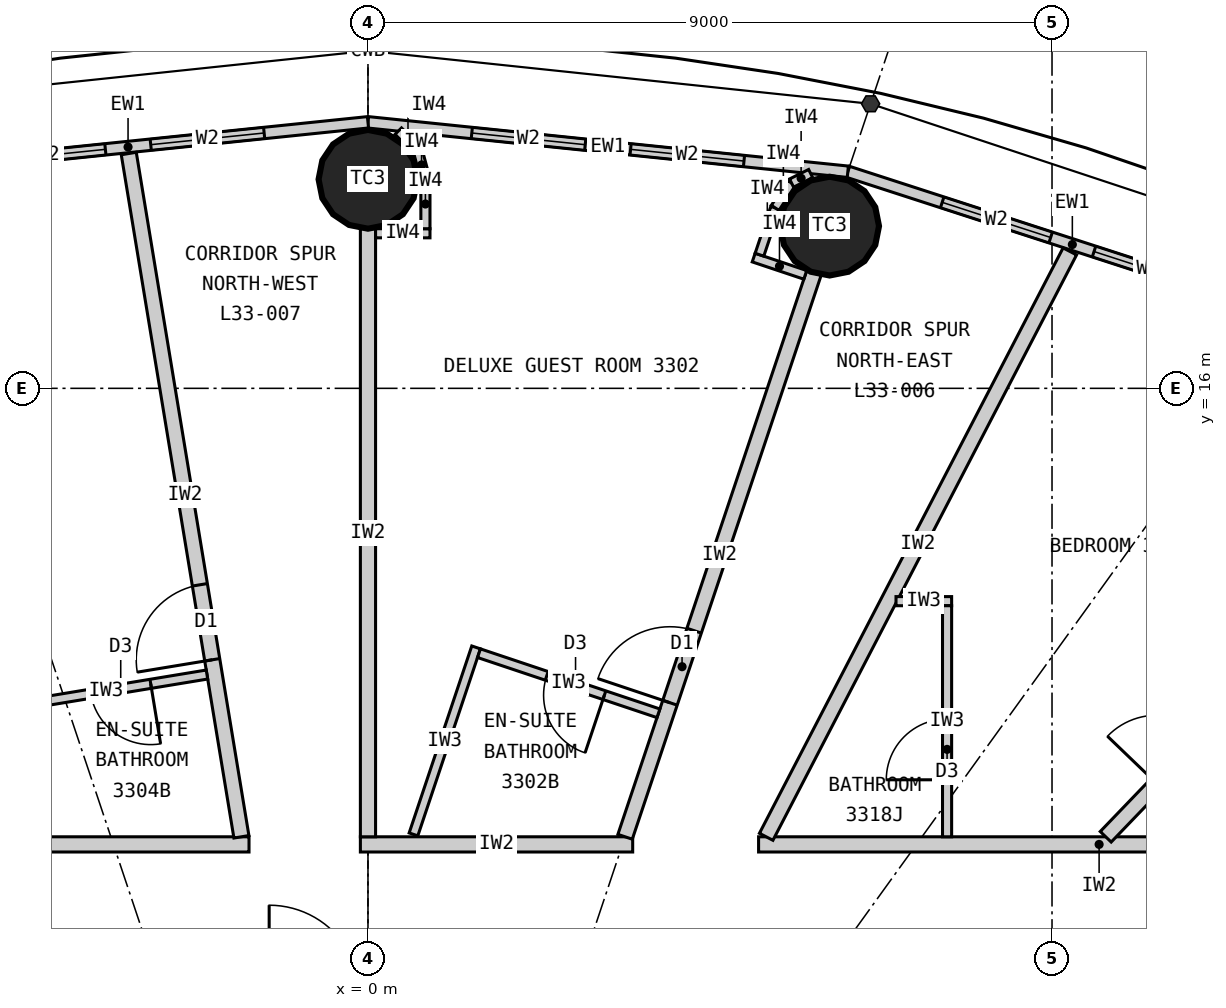
"""IFC4 building model, lengths in metres.
Left out: names, types, materials, properties, quantities, classifications, styles, units other than length and angle.
Written with IfcOpenShell. Run it as: python <this file> out.ifc"""

import sys

from ifc_helpers import new_model, si_unit, direction, frame, frame_2d, origin, origin_2d, place, context, subcontext, project, spatial, rectangle, circle, extrude, element, fill, save


model = new_model("IFC4")
c1 = context("Model", 3, precision=1e-05, world=origin(), true_north=direction((0.0, 1.0)))
c2 = subcontext(c1, "Body", "Model", "MODEL_VIEW")
j1 = project(units=[si_unit("LENGTHUNIT", "METRE"), si_unit("PLANEANGLEUNIT", "RADIAN")], contexts=[c1])
p1 = place(None, origin())
s1 = spatial("IfcSite", under=j1, at=p1, CompositionType="ELEMENT")
p2 = place(p1, origin())
s2 = spatial("IfcBuilding", under=s1, at=p2, CompositionType="ELEMENT")
p3 = place(p2, frame((0.0, 0.0, 128.7)))
s3 = spatial("IfcBuildingStorey", under=s2, at=p3, CompositionType="ELEMENT", Elevation=128.7)
for number, where, z_axis, x_axis in (
    (1, (6.074, 18.135, 0.0), (0.0, 0.0, 1.0), (1.0, 0.0, 0.0)),
    (2, (0.0, 18.75, 0.0), (0.0, 0.0, 1.0), (1.0, 0.0, 0.0)),
):
    element("IfcColumn", number, at=place(p3, frame(where, z_axis=z_axis, x_axis=x_axis)), inside=s3, PredefinedType="COLUMN", context=c2, shape_type="SweptSolid", body=[
        extrude(circle(Radius=0.65, at=origin_2d()), origin(), (0.0, 0.0, 1.0), 3.3),
    ])
p4 = place(p3, frame((12.221, 16.935, 0.0), z_axis=(0.0, 0.0, 1.0), x_axis=(-0.951272691506, 0.308350881944, 0.0)))
e3 = element("IfcWall", 3, at=p4, inside=s3, PredefinedType="ELEMENTEDWALL", context=c2, shape_type="SweptSolid", body=[
    extrude(rectangle(XDim=6.211, YDim=0.15, at=frame_2d((3.105, 0.0))), origin(), (0.0, 0.0, 1.0), 3.12),
])
p5 = place(p4, frame((1.305, 0.0, 0.9)))
e4 = element("IfcOpeningElement", 4, at=p5, cuts=e3, PredefinedType="OPENING", context=c2, shape_type="SweptSolid", body=[
    extrude(rectangle(XDim=1.5, YDim=1.9, at=frame_2d((0.75, 0.95))), frame((0.0, 0.085, 0.0), z_axis=(0.0, -1.0, 0.0), x_axis=(1.0, 0.0, 0.0)), (0.0, 0.0, 1.0), 0.17),
])
p6 = place(p4, frame((3.405, 0.0, 0.9)))
e5 = element("IfcOpeningElement", 5, at=p6, cuts=e3, PredefinedType="OPENING", context=c2, shape_type="SweptSolid", body=[
    extrude(rectangle(XDim=1.5, YDim=1.9, at=frame_2d((0.75, 0.95))), frame((0.0, 0.085, 0.0), z_axis=(0.0, -1.0, 0.0), x_axis=(1.0, 0.0, 0.0)), (0.0, 0.0, 1.0), 0.17),
])
p7 = place(p3, frame((6.313, 18.85, 0.0), z_axis=(0.0, 0.0, 1.0), x_axis=(-0.994735690163, 0.102473931887, 0.0)))
e6 = element("IfcWall", 6, at=p7, inside=s3, PredefinedType="ELEMENTEDWALL", context=c2, shape_type="SweptSolid", body=[
    extrude(rectangle(XDim=6.347, YDim=0.15, at=frame_2d((3.173, 0.0))), origin(), (0.0, 0.0, 1.0), 3.12),
])
p8 = place(p7, frame((1.373, 0.0, 0.9)))
e7 = element("IfcOpeningElement", 7, at=p8, cuts=e6, PredefinedType="OPENING", context=c2, shape_type="SweptSolid", body=[
    extrude(rectangle(XDim=1.5, YDim=1.9, at=frame_2d((0.75, 0.95))), frame((0.0, 0.085, 0.0), z_axis=(0.0, -1.0, 0.0), x_axis=(1.0, 0.0, 0.0)), (0.0, 0.0, 1.0), 0.17),
])
p9 = place(p7, frame((3.473, 0.0, 0.9)))
e8 = element("IfcOpeningElement", 8, at=p9, cuts=e6, PredefinedType="OPENING", context=c2, shape_type="SweptSolid", body=[
    extrude(rectangle(XDim=1.5, YDim=1.9, at=frame_2d((0.75, 0.95))), frame((0.0, 0.085, 0.0), z_axis=(0.0, -1.0, 0.0), x_axis=(1.0, 0.0, 0.0)), (0.0, 0.0, 1.0), 0.17),
])
p10 = place(p3, frame((0.0, 19.5, 0.0), z_axis=(0.0, 0.0, 1.0), x_axis=(-0.994735690163, -0.102473931887, 0.0)))
e9 = element("IfcWall", 9, at=p10, inside=s3, PredefinedType="ELEMENTEDWALL", context=c2, shape_type="SweptSolid", body=[
    extrude(rectangle(XDim=6.347, YDim=0.15, at=frame_2d((3.173, 0.0))), origin(), (0.0, 0.0, 1.0), 3.12),
])
p11 = place(p10, frame((1.373, 0.0, 0.9)))
e10 = element("IfcOpeningElement", 10, at=p11, cuts=e9, PredefinedType="OPENING", context=c2, shape_type="SweptSolid", body=[
    extrude(rectangle(XDim=1.5, YDim=1.9, at=frame_2d((0.75, 0.95))), frame((0.0, 0.085, 0.0), z_axis=(0.0, -1.0, 0.0), x_axis=(1.0, 0.0, 0.0)), (0.0, 0.0, 1.0), 0.17),
])
p12 = place(p10, frame((3.473, 0.0, 0.9)))
e11 = element("IfcOpeningElement", 11, at=p12, cuts=e9, PredefinedType="OPENING", context=c2, shape_type="SweptSolid", body=[
    extrude(rectangle(XDim=1.5, YDim=1.9, at=frame_2d((0.75, 0.95))), frame((0.0, 0.085, 0.0), z_axis=(0.0, -1.0, 0.0), x_axis=(1.0, 0.0, 0.0)), (0.0, 0.0, 1.0), 0.17),
])
p13 = place(p3, frame((-14.1, 10.0, 0.0), z_axis=(0.0, 0.0, 1.0), x_axis=(1.0, 0.0, 0.0)))
e12 = element("IfcWall", 12, at=p13, inside=s3, PredefinedType="PARTITIONING", context=c2, shape_type="SweptSolid", body=[
    extrude(rectangle(XDim=12.535, YDim=0.2, at=frame_2d((6.268, 0.0))), origin(), (0.0, 0.0, 1.0), 3.12),
])
p14 = place(p13, frame((2.801, 0.0, 0.0)))
e13 = element("IfcOpeningElement", 13, at=p14, cuts=e12, PredefinedType="OPENING", context=c2, shape_type="SweptSolid", body=[
    extrude(rectangle(XDim=1.0, YDim=2.2, at=frame_2d((0.5, 1.1))), frame((0.0, 0.11, 0.0), z_axis=(0.0, -1.0, 0.0), x_axis=(1.0, 0.0, 0.0)), (0.0, 0.0, 1.0), 0.22),
])
p15 = place(p3, frame((-0.1, 10.0, 0.0), z_axis=(0.0, 0.0, 1.0), x_axis=(1.0, 0.0, 0.0)))
e14 = element("IfcWall", 14, at=p15, inside=s3, PredefinedType="PARTITIONING", context=c2, shape_type="SweptSolid", body=[
    extrude(rectangle(XDim=3.583, YDim=0.2, at=frame_2d((1.792, 0.0))), origin(), (0.0, 0.0, 1.0), 3.12),
])
p16 = place(p3, frame((5.139, 10.0, 0.0), z_axis=(0.0, 0.0, 1.0), x_axis=(1.0, 0.0, 0.0)))
e15 = element("IfcWall", 15, at=p16, inside=s3, PredefinedType="PARTITIONING", context=c2, shape_type="SweptSolid", body=[
    extrude(rectangle(XDim=8.961, YDim=0.2, at=frame_2d((4.48, 0.0))), origin(), (0.0, 0.0, 1.0), 3.12),
])
p17 = place(p3, frame((9.706, 10.1, 0.0), z_axis=(0.0, 0.0, 1.0), x_axis=(0.692944801824, 0.720990639069, 0.0)))
e16 = element("IfcWall", 16, at=p17, inside=s3, PredefinedType="PARTITIONING", context=c2, shape_type="SweptSolid", body=[
    extrude(rectangle(XDim=7.234, YDim=0.2, at=frame_2d((3.617, 0.0))), origin(), (0.0, 0.0, 1.0), 3.12),
])
p18 = place(p17, frame((0.97, 0.0, 0.0)))
e17 = element("IfcOpeningElement", 17, at=p18, cuts=e16, PredefinedType="OPENING", context=c2, shape_type="SweptSolid", body=[
    extrude(rectangle(XDim=0.9, YDim=2.1, at=frame_2d((0.45, 1.05))), frame((0.0, 0.11, 0.0), z_axis=(0.0, -1.0, 0.0), x_axis=(1.0, 0.0, 0.0)), (0.0, 0.0, 1.0), 0.22),
])
p19 = place(p3, frame((5.239, 10.1, 0.0), z_axis=(0.0, 0.0, 1.0), x_axis=(0.4604797896, 0.887670188398, 0.0)))
e18 = element("IfcWall", 18, at=p19, inside=s3, PredefinedType="PARTITIONING", context=c2, shape_type="SweptSolid", body=[
    extrude(rectangle(XDim=8.676, YDim=0.2, at=frame_2d((4.338, 0.0))), origin(), (0.0, 0.0, 1.0), 3.12),
])
p20 = place(p3, frame((3.383, 10.1, 0.0), z_axis=(0.0, 0.0, 1.0), x_axis=(0.317603705574, 0.948223542318, 0.0)))
e19 = element("IfcWall", 19, at=p20, inside=s3, PredefinedType="PARTITIONING", context=c2, shape_type="SweptSolid", body=[
    extrude(rectangle(XDim=7.823, YDim=0.2, at=frame_2d((3.912, 0.0))), origin(), (0.0, 0.0, 1.0), 2.37),
])
p21 = place(p20, frame((1.86, 0.0, 0.0)))
e20 = element("IfcOpeningElement", 20, at=p21, cuts=e19, PredefinedType="OPENING", context=c2, shape_type="SweptSolid", body=[
    extrude(rectangle(XDim=1.0, YDim=2.2, at=frame_2d((0.5, 1.1))), frame((0.0, 0.11, 0.0), z_axis=(0.0, -1.0, 0.0), x_axis=(1.0, 0.0, 0.0)), (0.0, 0.0, 1.0), 0.22),
])
p22 = place(p3, frame((0.0, 10.1, 0.0), z_axis=(0.0, 0.0, 1.0), x_axis=(0.0, 1.0, 0.0)))
e21 = element("IfcWall", 21, at=p22, inside=s3, PredefinedType="PARTITIONING", context=c2, shape_type="SweptSolid", body=[
    extrude(rectangle(XDim=8.0, YDim=0.2, at=frame_2d((4.0, 0.0))), origin(), (0.0, 0.0, 1.0), 2.37),
])
p23 = place(p3, frame((-1.665, 10.1, 0.0), z_axis=(0.0, 0.0, 1.0), x_axis=(-0.162660519103, 0.986682094459, 0.0)))
e22 = element("IfcWall", 22, at=p23, inside=s3, PredefinedType="PARTITIONING", context=c2, shape_type="SweptSolid", body=[
    extrude(rectangle(XDim=9.111, YDim=0.2, at=frame_2d((4.555, 0.0))), origin(), (0.0, 0.0, 1.0), 3.12),
])
p24 = place(p23, frame((2.36, 0.0, 0.0)))
e23 = element("IfcOpeningElement", 23, at=p24, cuts=e22, PredefinedType="OPENING", context=c2, shape_type="SweptSolid", body=[
    extrude(rectangle(XDim=1.0, YDim=2.2, at=frame_2d((0.5, 1.1))), frame((0.0, 0.11, 0.0), z_axis=(0.0, -1.0, 0.0), x_axis=(1.0, 0.0, 0.0)), (0.0, 0.0, 1.0), 0.22),
])
p25 = place(p3, frame((0.599, 10.132, 0.0), z_axis=(0.0, 0.0, 1.0), x_axis=(0.317554522053, 0.948240014724, 0.0)))
e24 = element("IfcWall", 24, at=p25, inside=s3, PredefinedType="PARTITIONING", context=c2, shape_type="SweptSolid", body=[
    extrude(rectangle(XDim=2.594, YDim=0.12, at=frame_2d((1.297, 0.0))), origin(), (0.0, 0.0, 1.0), 3.12),
])
p26 = place(p3, frame((3.822, 11.725, 0.0), z_axis=(0.0, 0.0, 1.0), x_axis=(-0.948231307998, 0.317580519761, 0.0)))
e25 = element("IfcWall", 25, at=p26, inside=s3, PredefinedType="PARTITIONING", context=c2, shape_type="SweptSolid", body=[
    extrude(rectangle(XDim=2.49, YDim=0.12, at=frame_2d((1.245, 0.0))), origin(), (0.0, 0.0, 1.0), 3.12),
])
p27 = place(p26, frame((0.75, 0.0, 0.0)))
e26 = element("IfcOpeningElement", 26, at=p27, cuts=e25, PredefinedType="OPENING", context=c2, shape_type="SweptSolid", body=[
    extrude(rectangle(XDim=0.8, YDim=2.1, at=frame_2d((0.4, 1.05))), frame((0.0, 0.07, 0.0), z_axis=(0.0, -1.0, 0.0), x_axis=(1.0, 0.0, 0.0)), (0.0, 0.0, 1.0), 0.14),
])
p28 = place(p3, frame((-2.118, 12.235, 0.0), z_axis=(0.0, 0.0, 1.0), x_axis=(-0.986686682911, -0.16263268357, 0.0)))
e27 = element("IfcWall", 27, at=p28, inside=s3, PredefinedType="PARTITIONING", context=c2, shape_type="SweptSolid", body=[
    extrude(rectangle(XDim=2.69, YDim=0.12, at=frame_2d((1.345, 0.0))), origin(), (0.0, 0.0, 1.0), 3.12),
])
p29 = place(p28, frame((0.75, 0.0, 0.0)))
e28 = element("IfcOpeningElement", 28, at=p29, cuts=e27, PredefinedType="OPENING", context=c2, shape_type="SweptSolid", body=[
    extrude(rectangle(XDim=0.8, YDim=2.1, at=frame_2d((0.4, 1.05))), frame((0.0, 0.07, 0.0), z_axis=(0.0, -1.0, 0.0), x_axis=(1.0, 0.0, 0.0)), (0.0, 0.0, 1.0), 0.14),
])
p30 = place(p3, frame((6.947, 13.2, 0.0), z_axis=(0.0, 0.0, 1.0), x_axis=(1.0, 0.0, 0.0)))
e29 = element("IfcWall", 29, at=p30, inside=s3, PredefinedType="PARTITIONING", context=c2, shape_type="SweptSolid", body=[
    extrude(rectangle(XDim=0.732, YDim=0.12, at=frame_2d((0.366, 0.0))), origin(), (0.0, 0.0, 1.0), 3.12),
])
p31 = place(p3, frame((7.619, 10.1, 0.0), z_axis=(0.0, 0.0, 1.0), x_axis=(0.0, 1.0, 0.0)))
e30 = element("IfcWall", 30, at=p31, inside=s3, PredefinedType="PARTITIONING", context=c2, shape_type="SweptSolid", body=[
    extrude(rectangle(XDim=3.04, YDim=0.12, at=frame_2d((1.52, 0.0))), origin(), (0.0, 0.0, 1.0), 3.12),
])
p32 = place(p31, frame((0.75, 0.0, 0.0)))
e31 = element("IfcOpeningElement", 31, at=p32, cuts=e30, PredefinedType="OPENING", context=c2, shape_type="SweptSolid", body=[
    extrude(rectangle(XDim=0.8, YDim=2.1, at=frame_2d((0.4, 1.05))), frame((0.0, 0.07, 0.0), z_axis=(0.0, -1.0, 0.0), x_axis=(1.0, 0.0, 0.0)), (0.0, 0.0, 1.0), 0.14),
])
p33 = place(p3, frame((5.754, 17.493, 0.0), z_axis=(0.0, 0.0, 1.0), x_axis=(-0.9482389443, 0.317557718397, 0.0)))
e32 = element("IfcWall", 32, at=p33, inside=s3, PredefinedType="PARTITIONING", context=c2, shape_type="SweptSolid", body=[
    extrude(rectangle(XDim=0.716, YDim=0.12, at=frame_2d((0.358, 0.0))), origin(), (0.0, 0.0, 1.0), 3.12),
])
p34 = place(p3, frame((5.151, 17.758, 0.0), z_axis=(0.0, 0.0, 1.0), x_axis=(0.317354244456, 0.948307061835, 0.0)))
e33 = element("IfcWall", 33, at=p34, inside=s3, PredefinedType="PARTITIONING", context=c2, shape_type="SweptSolid", body=[
    extrude(rectangle(XDim=0.65, YDim=0.12, at=frame_2d((0.325, 0.0))), origin(), (0.0, 0.0, 1.0), 3.12),
])
p35 = place(p3, frame((5.357, 18.375, 0.0), z_axis=(0.0, 0.0, 1.0), x_axis=(0.552249752128, 0.833678721856, 0.0)))
e34 = element("IfcWall", 34, at=p35, inside=s3, PredefinedType="PARTITIONING", context=c2, shape_type="SweptSolid", body=[
    extrude(rectangle(XDim=0.391, YDim=0.12, at=frame_2d((0.196, 0.0))), origin(), (0.0, 0.0, 1.0), 3.12),
])
p36 = place(p3, frame((5.573, 18.701, 0.0), z_axis=(0.0, 0.0, 1.0), x_axis=(0.895295561985, 0.445472621707, 0.0)))
e35 = element("IfcWall", 35, at=p36, inside=s3, PredefinedType="PARTITIONING", context=c2, shape_type="SweptSolid", body=[
    extrude(rectangle(XDim=0.281, YDim=0.12, at=frame_2d((0.14, 0.0))), origin(), (0.0, 0.0, 1.0), 3.12),
])
p37 = place(p3, frame((0.1, 18.04, 0.0), z_axis=(0.0, 0.0, 1.0), x_axis=(1.0, 0.0, 0.0)))
e36 = element("IfcWall", 36, at=p37, inside=s3, PredefinedType="PARTITIONING", context=c2, shape_type="SweptSolid", body=[
    extrude(rectangle(XDim=0.716, YDim=0.12, at=frame_2d((0.358, 0.0))), origin(), (0.0, 0.0, 1.0), 3.12),
])
p38 = place(p3, frame((0.756, 18.1, 0.0), z_axis=(0.0, 0.0, 1.0), x_axis=(0.0, 1.0, 0.0)))
e37 = element("IfcWall", 37, at=p38, inside=s3, PredefinedType="PARTITIONING", context=c2, shape_type="SweptSolid", body=[
    extrude(rectangle(XDim=0.65, YDim=0.12, at=frame_2d((0.325, 0.0))), origin(), (0.0, 0.0, 1.0), 3.12),
])
p39 = place(p3, frame((0.756, 18.75, 0.0), z_axis=(0.0, 0.0, 1.0), x_axis=(-0.2589440045, 0.965892334856, 0.0)))
e38 = element("IfcWall", 38, at=p39, inside=s3, PredefinedType="PARTITIONING", context=c2, shape_type="SweptSolid", body=[
    extrude(rectangle(XDim=0.391, YDim=0.12, at=frame_2d((0.196, 0.0))), origin(), (0.0, 0.0, 1.0), 3.12),
])
p40 = place(p3, frame((0.655, 19.128, 0.0), z_axis=(0.0, 0.0, 1.0), x_axis=(-0.707443899976, 0.706769501596, 0.0)))
e39 = element("IfcWall", 39, at=p40, inside=s3, PredefinedType="PARTITIONING", context=c2, shape_type="SweptSolid", body=[
    extrude(rectangle(XDim=0.362, YDim=0.12, at=frame_2d((0.181, 0.0))), origin(), (0.0, 0.0, 1.0), 3.12),
])
p41 = place(p5, origin())
e40 = element("IfcWindow", 40, at=p41, inside=s3, PartitioningType="SINGLE_PANEL", PredefinedType="WINDOW", context=c2, shape_type="SweptSolid", body=[
    extrude(rectangle(XDim=1.5, YDim=1.9, at=frame_2d((0.75, 0.95))), frame((0.0, 0.03, 0.0), z_axis=(0.0, -1.0, 0.0), x_axis=(1.0, 0.0, 0.0)), (0.0, 0.0, 1.0), 0.06),
])
fill(e4, e40)
p42 = place(p6, origin())
e41 = element("IfcWindow", 41, at=p42, inside=s3, PartitioningType="SINGLE_PANEL", PredefinedType="WINDOW", context=c2, shape_type="SweptSolid", body=[
    extrude(rectangle(XDim=1.5, YDim=1.9, at=frame_2d((0.75, 0.95))), frame((0.0, 0.03, 0.0), z_axis=(0.0, -1.0, 0.0), x_axis=(1.0, 0.0, 0.0)), (0.0, 0.0, 1.0), 0.06),
])
fill(e5, e41)
p43 = place(p8, origin())
e42 = element("IfcWindow", 42, at=p43, inside=s3, PartitioningType="SINGLE_PANEL", PredefinedType="WINDOW", context=c2, shape_type="SweptSolid", body=[
    extrude(rectangle(XDim=1.5, YDim=1.9, at=frame_2d((0.75, 0.95))), frame((0.0, 0.03, 0.0), z_axis=(0.0, -1.0, 0.0), x_axis=(1.0, 0.0, 0.0)), (0.0, 0.0, 1.0), 0.06),
])
fill(e7, e42)
p44 = place(p9, origin())
e43 = element("IfcWindow", 43, at=p44, inside=s3, PartitioningType="SINGLE_PANEL", PredefinedType="WINDOW", context=c2, shape_type="SweptSolid", body=[
    extrude(rectangle(XDim=1.5, YDim=1.9, at=frame_2d((0.75, 0.95))), frame((0.0, 0.03, 0.0), z_axis=(0.0, -1.0, 0.0), x_axis=(1.0, 0.0, 0.0)), (0.0, 0.0, 1.0), 0.06),
])
fill(e8, e43)
p45 = place(p11, origin())
e44 = element("IfcWindow", 44, at=p45, inside=s3, PartitioningType="SINGLE_PANEL", PredefinedType="WINDOW", context=c2, shape_type="SweptSolid", body=[
    extrude(rectangle(XDim=1.5, YDim=1.9, at=frame_2d((0.75, 0.95))), frame((0.0, 0.03, 0.0), z_axis=(0.0, -1.0, 0.0), x_axis=(1.0, 0.0, 0.0)), (0.0, 0.0, 1.0), 0.06),
])
fill(e10, e44)
p46 = place(p12, origin())
e45 = element("IfcWindow", 45, at=p46, inside=s3, PartitioningType="SINGLE_PANEL", PredefinedType="WINDOW", context=c2, shape_type="SweptSolid", body=[
    extrude(rectangle(XDim=1.5, YDim=1.9, at=frame_2d((0.75, 0.95))), frame((0.0, 0.03, 0.0), z_axis=(0.0, -1.0, 0.0), x_axis=(1.0, 0.0, 0.0)), (0.0, 0.0, 1.0), 0.06),
])
fill(e11, e45)
p47 = place(p27, origin())
e46 = element("IfcDoor", 46, at=p47, inside=s3, OperationType="SINGLE_SWING_LEFT", PredefinedType="DOOR", context=c2, shape_type="SweptSolid", body=[
    extrude(rectangle(XDim=0.8, YDim=2.1, at=frame_2d((0.4, 1.05))), frame((0.0, 0.025, 0.0), z_axis=(0.0, -1.0, 0.0), x_axis=(1.0, 0.0, 0.0)), (0.0, 0.0, 1.0), 0.05),
])
fill(e26, e46)
p48 = place(p21, origin())
e47 = element("IfcDoor", 47, at=p48, inside=s3, OperationType="SINGLE_SWING_LEFT", PredefinedType="DOOR", context=c2, shape_type="SweptSolid", body=[
    extrude(rectangle(XDim=1.0, YDim=2.2, at=frame_2d((0.5, 1.1))), frame((0.0, 0.025, 0.0), z_axis=(0.0, -1.0, 0.0), x_axis=(1.0, 0.0, 0.0)), (0.0, 0.0, 1.0), 0.05),
])
fill(e20, e47)
p49 = place(p29, origin())
e48 = element("IfcDoor", 48, at=p49, inside=s3, OperationType="SINGLE_SWING_LEFT", PredefinedType="DOOR", context=c2, shape_type="SweptSolid", body=[
    extrude(rectangle(XDim=0.8, YDim=2.1, at=frame_2d((0.4, 1.05))), frame((0.0, 0.025, 0.0), z_axis=(0.0, -1.0, 0.0), x_axis=(1.0, 0.0, 0.0)), (0.0, 0.0, 1.0), 0.05),
])
fill(e28, e48)
p50 = place(p24, origin())
e49 = element("IfcDoor", 49, at=p50, inside=s3, OperationType="SINGLE_SWING_LEFT", PredefinedType="DOOR", context=c2, shape_type="SweptSolid", body=[
    extrude(rectangle(XDim=1.0, YDim=2.2, at=frame_2d((0.5, 1.1))), frame((0.0, 0.025, 0.0), z_axis=(0.0, -1.0, 0.0), x_axis=(1.0, 0.0, 0.0)), (0.0, 0.0, 1.0), 0.05),
])
fill(e23, e49)
p51 = place(p32, origin())
e50 = element("IfcDoor", 50, at=p51, inside=s3, OperationType="SINGLE_SWING_LEFT", PredefinedType="DOOR", context=c2, shape_type="SweptSolid", body=[
    extrude(rectangle(XDim=0.8, YDim=2.1, at=frame_2d((0.4, 1.05))), frame((0.0, 0.025, 0.0), z_axis=(0.0, -1.0, 0.0), x_axis=(1.0, 0.0, 0.0)), (0.0, 0.0, 1.0), 0.05),
])
fill(e31, e50)
save(model, sys.argv[1])
